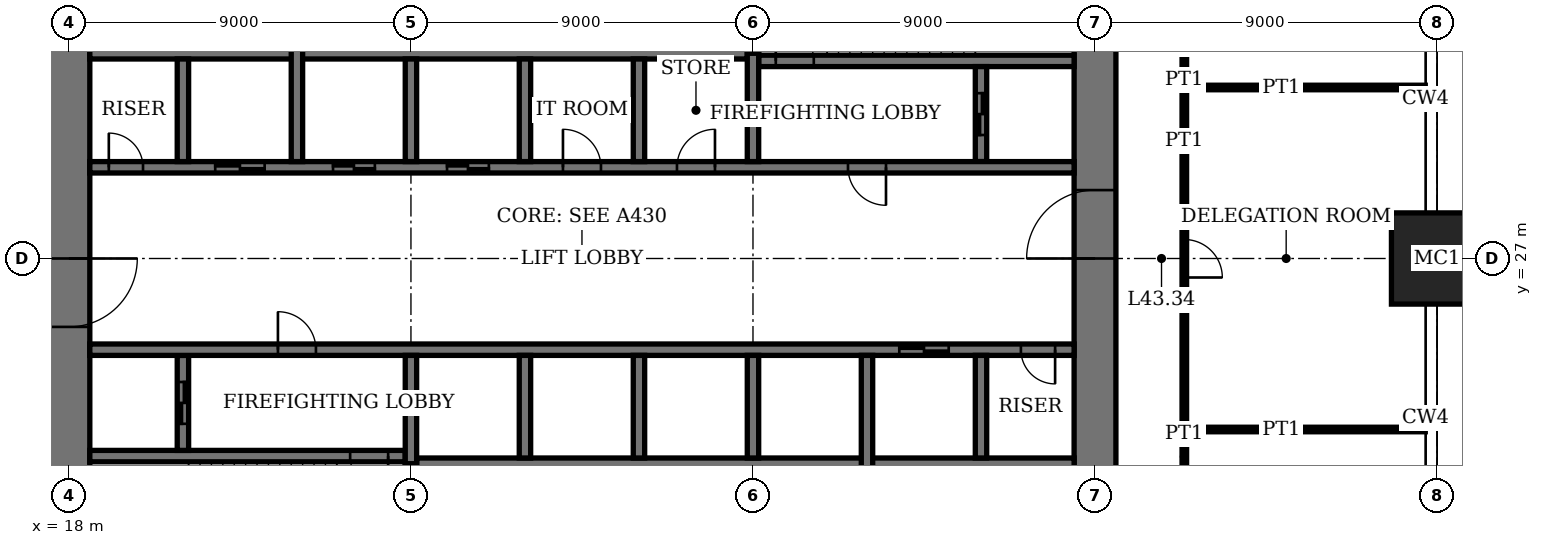
"""IFC4 building model, lengths in metres.
Left out: names, types, materials, properties, quantities, classifications, styles, units other than length and angle.
Written with IfcOpenShell. Run it as: python <this file> out.ifc"""

import sys

from ifc_helpers import new_model, si_unit, direction, frame, frame_2d, origin, origin_2d, place, context, subcontext, project, spatial, rectangle, extrude, element, fill, save


model = new_model("IFC4")
c1 = context("Model", 3, precision=1e-05, world=origin(), true_north=direction((0.0, 1.0)))
c2 = subcontext(c1, "Body", "Model", "MODEL_VIEW")
j1 = project(units=[si_unit("LENGTHUNIT", "METRE"), si_unit("PLANEANGLEUNIT", "RADIAN")], contexts=[c1])
p1 = place(None, origin())
s1 = spatial("IfcSite", under=j1, at=p1, CompositionType="ELEMENT")
p2 = place(p1, origin())
s2 = spatial("IfcBuilding", under=s1, at=p2, CompositionType="ELEMENT")
p3 = place(p2, frame((0.0, 0.0, 178.2)))
s3 = spatial("IfcBuildingStorey", under=s2, at=p3, CompositionType="ELEMENT", Elevation=178.2)
p4 = place(p3, frame((54.0, 27.0, 0.0), z_axis=(0.0, 0.0, 1.0), x_axis=(1.0, 0.0, 0.0)))
e1 = element("IfcColumn", 1, at=p4, inside=s3, PredefinedType="COLUMN", context=c2, shape_type="SweptSolid", body=[
    extrude(rectangle(XDim=2.4, YDim=2.4, at=origin_2d()), origin(), (0.0, 0.0, 1.0), 4.0),
])
p5 = place(p3, frame((18.0, 35.45, 0.0), z_axis=(0.0, 0.0, 1.0), x_axis=(0.0, -1.0, 0.0)))
e2 = element("IfcWall", 2, at=p5, inside=s3, PredefinedType="SHEAR", context=c2, shape_type="SweptSolid", body=[
    extrude(rectangle(XDim=16.9, YDim=1.1, at=frame_2d((8.45, 0.0))), origin(), (0.0, 0.0, 1.0), 4.0),
])
p6 = place(p5, frame((8.45, 0.0, 0.0)))
e3 = element("IfcOpeningElement", 3, at=p6, cuts=e2, PredefinedType="OPENING", context=c2, shape_type="SweptSolid", body=[
    extrude(rectangle(XDim=1.8, YDim=2.4, at=frame_2d((0.9, 1.2))), frame((0.0, 0.56, 0.0), z_axis=(0.0, -1.0, 0.0), x_axis=(1.0, 0.0, 0.0)), (0.0, 0.0, 1.0), 1.12),
])
p7 = place(p3, frame((45.0, 18.55, 0.0), z_axis=(0.0, 0.0, 1.0), x_axis=(0.0, 1.0, 0.0)))
e4 = element("IfcWall", 4, at=p7, inside=s3, PredefinedType="SHEAR", context=c2, shape_type="SweptSolid", body=[
    extrude(rectangle(XDim=16.9, YDim=1.1, at=frame_2d((8.45, 0.0))), origin(), (0.0, 0.0, 1.0), 4.0),
])
p8 = place(p7, frame((8.45, 0.0, 0.0)))
e5 = element("IfcOpeningElement", 5, at=p8, cuts=e4, PredefinedType="OPENING", context=c2, shape_type="SweptSolid", body=[
    extrude(rectangle(XDim=1.8, YDim=2.4, at=frame_2d((0.9, 1.2))), frame((0.0, 0.56, 0.0), z_axis=(0.0, -1.0, 0.0), x_axis=(1.0, 0.0, 0.0)), (0.0, 0.0, 1.0), 1.12),
])
p9 = place(p3, frame((18.55, 21.8, 0.0), z_axis=(0.0, 0.0, 1.0), x_axis=(1.0, 0.0, 0.0)))
e6 = element("IfcWall", 6, at=p9, inside=s3, PredefinedType="SHEAR", context=c2, shape_type="SweptSolid", body=[
    extrude(rectangle(XDim=8.3, YDim=0.3, at=frame_2d((4.15, 0.0))), origin(), (0.0, 0.0, 1.0), 4.0),
])
p10 = place(p9, frame((6.85, 0.0, 0.0)))
e7 = element("IfcOpeningElement", 7, at=p10, cuts=e6, PredefinedType="OPENING", context=c2, shape_type="SweptSolid", body=[
    extrude(rectangle(XDim=1.0, YDim=2.4, at=frame_2d((0.5, 1.2))), frame((0.0, 0.16, 0.0), z_axis=(0.0, -1.0, 0.0), x_axis=(1.0, 0.0, 0.0)), (0.0, 0.0, 1.0), 0.32),
])
p11 = place(p3, frame((36.15, 32.2, 0.0), z_axis=(0.0, 0.0, 1.0), x_axis=(1.0, 0.0, 0.0)))
e8 = element("IfcWall", 8, at=p11, inside=s3, PredefinedType="SHEAR", context=c2, shape_type="SweptSolid", body=[
    extrude(rectangle(XDim=8.3, YDim=0.3, at=frame_2d((4.15, 0.0))), origin(), (0.0, 0.0, 1.0), 4.0),
])
p12 = place(p11, frame((0.45, 0.0, 0.0)))
e9 = element("IfcOpeningElement", 9, at=p12, cuts=e8, PredefinedType="OPENING", context=c2, shape_type="SweptSolid", body=[
    extrude(rectangle(XDim=1.0, YDim=2.4, at=frame_2d((0.5, 1.2))), frame((0.0, 0.16, 0.0), z_axis=(0.0, -1.0, 0.0), x_axis=(1.0, 0.0, 0.0)), (0.0, 0.0, 1.0), 0.32),
])
for number, where, z_axis, x_axis in (
    (10, (27.0, 18.55, 0.0), (0.0, 0.0, 1.0), (0.0, 1.0, 0.0)),
    (11, (36.0, 32.4, 0.0), (0.0, 0.0, 1.0), (0.0, 1.0, 0.0)),
):
    element("IfcWall", number, at=place(p3, frame(where, z_axis=z_axis, x_axis=x_axis)), inside=s3, PredefinedType="SHEAR", context=c2, shape_type="SweptSolid", body=[
        extrude(rectangle(XDim=3.05, YDim=0.3, at=frame_2d((1.525, 0.0))), origin(), (0.0, 0.0, 1.0), 4.0),
    ])
p13 = place(p3, frame((21.0, 21.95, 0.0), z_axis=(0.0, 0.0, 1.0), x_axis=(0.0, 1.0, 0.0)))
e12 = element("IfcWall", 12, at=p13, inside=s3, PredefinedType="SHEAR", context=c2, shape_type="SweptSolid", body=[
    extrude(rectangle(XDim=2.5, YDim=0.3, at=frame_2d((1.25, 0.0))), origin(), (0.0, 0.0, 1.0), 4.0),
])
p14 = place(p13, frame((0.7, 0.0, 0.0)))
e13 = element("IfcOpeningElement", 13, at=p14, cuts=e12, PredefinedType="OPENING", context=c2, shape_type="SweptSolid", body=[
    extrude(rectangle(XDim=1.1, YDim=2.4, at=frame_2d((0.55, 1.2))), frame((0.0, 0.16, 0.0), z_axis=(0.0, -1.0, 0.0), x_axis=(1.0, 0.0, 0.0)), (0.0, 0.0, 1.0), 0.32),
])
p15 = place(p3, frame((42.0, 29.55, 0.0), z_axis=(0.0, 0.0, 1.0), x_axis=(0.0, 1.0, 0.0)))
e14 = element("IfcWall", 14, at=p15, inside=s3, PredefinedType="SHEAR", context=c2, shape_type="SweptSolid", body=[
    extrude(rectangle(XDim=2.5, YDim=0.3, at=frame_2d((1.25, 0.0))), origin(), (0.0, 0.0, 1.0), 4.0),
])
p16 = place(p15, frame((0.7, 0.0, 0.0)))
e15 = element("IfcOpeningElement", 15, at=p16, cuts=e14, PredefinedType="OPENING", context=c2, shape_type="SweptSolid", body=[
    extrude(rectangle(XDim=1.1, YDim=2.4, at=frame_2d((0.55, 1.2))), frame((0.0, 0.16, 0.0), z_axis=(0.0, -1.0, 0.0), x_axis=(1.0, 0.0, 0.0)), (0.0, 0.0, 1.0), 0.32),
])
p17 = place(p3, frame((18.55, 24.6, 0.0), z_axis=(0.0, 0.0, 1.0), x_axis=(1.0, 0.0, 0.0)))
e16 = element("IfcWall", 16, at=p17, inside=s3, PredefinedType="SHEAR", context=c2, shape_type="SweptSolid", body=[
    extrude(rectangle(XDim=25.9, YDim=0.3, at=frame_2d((12.95, 0.0))), origin(), (0.0, 0.0, 1.0), 4.0),
])
p18 = place(p17, frame((4.95, 0.0, 0.0)))
e17 = element("IfcOpeningElement", 17, at=p18, cuts=e16, PredefinedType="OPENING", context=c2, shape_type="SweptSolid", body=[
    extrude(rectangle(XDim=1.0, YDim=2.4, at=frame_2d((0.5, 1.2))), frame((0.0, 0.16, 0.0), z_axis=(0.0, -1.0, 0.0), x_axis=(1.0, 0.0, 0.0)), (0.0, 0.0, 1.0), 0.32),
])
p19 = place(p17, frame((24.5, 0.0, 0.0)))
e18 = element("IfcOpeningElement", 18, at=p19, cuts=e16, PredefinedType="OPENING", context=c2, shape_type="SweptSolid", body=[
    extrude(rectangle(XDim=0.9, YDim=2.1, at=frame_2d((0.45, 1.05))), frame((0.0, 0.16, 0.0), z_axis=(0.0, -1.0, 0.0), x_axis=(1.0, 0.0, 0.0)), (0.0, 0.0, 1.0), 0.32),
])
p20 = place(p17, frame((21.3, 0.0, 0.0)))
e19 = element("IfcOpeningElement", 19, at=p20, cuts=e16, PredefinedType="OPENING", context=c2, shape_type="SweptSolid", body=[
    extrude(rectangle(XDim=1.3, YDim=2.4, at=frame_2d((0.65, 1.2))), frame((0.0, 0.16, 0.0), z_axis=(0.0, -1.0, 0.0), x_axis=(1.0, 0.0, 0.0)), (0.0, 0.0, 1.0), 0.32),
])
p21 = place(p3, frame((18.55, 29.4, 0.0), z_axis=(0.0, 0.0, 1.0), x_axis=(1.0, 0.0, 0.0)))
e20 = element("IfcWall", 20, at=p21, inside=s3, PredefinedType="SHEAR", context=c2, shape_type="SweptSolid", body=[
    extrude(rectangle(XDim=25.9, YDim=0.3, at=frame_2d((12.95, 0.0))), origin(), (0.0, 0.0, 1.0), 4.0),
])
p22 = place(p21, frame((19.95, 0.0, 0.0)))
e21 = element("IfcOpeningElement", 21, at=p22, cuts=e20, PredefinedType="OPENING", context=c2, shape_type="SweptSolid", body=[
    extrude(rectangle(XDim=1.0, YDim=2.4, at=frame_2d((0.5, 1.2))), frame((0.0, 0.16, 0.0), z_axis=(0.0, -1.0, 0.0), x_axis=(1.0, 0.0, 0.0)), (0.0, 0.0, 1.0), 0.32),
])
p23 = place(p21, frame((0.5, 0.0, 0.0)))
e22 = element("IfcOpeningElement", 22, at=p23, cuts=e20, PredefinedType="OPENING", context=c2, shape_type="SweptSolid", body=[
    extrude(rectangle(XDim=0.9, YDim=2.1, at=frame_2d((0.45, 1.05))), frame((0.0, 0.16, 0.0), z_axis=(0.0, -1.0, 0.0), x_axis=(1.0, 0.0, 0.0)), (0.0, 0.0, 1.0), 0.32),
])
p24 = place(p21, frame((15.45, 0.0, 0.0)))
e23 = element("IfcOpeningElement", 23, at=p24, cuts=e20, PredefinedType="OPENING", context=c2, shape_type="SweptSolid", body=[
    extrude(rectangle(XDim=1.0, YDim=2.4, at=frame_2d((0.5, 1.2))), frame((0.0, 0.16, 0.0), z_axis=(0.0, -1.0, 0.0), x_axis=(1.0, 0.0, 0.0)), (0.0, 0.0, 1.0), 0.32),
])
p25 = place(p21, frame((12.45, 0.0, 0.0)))
e24 = element("IfcOpeningElement", 24, at=p25, cuts=e20, PredefinedType="OPENING", context=c2, shape_type="SweptSolid", body=[
    extrude(rectangle(XDim=1.0, YDim=2.4, at=frame_2d((0.5, 1.2))), frame((0.0, 0.16, 0.0), z_axis=(0.0, -1.0, 0.0), x_axis=(1.0, 0.0, 0.0)), (0.0, 0.0, 1.0), 0.32),
])
p26 = place(p21, frame((9.4, 0.0, 0.0)))
e25 = element("IfcOpeningElement", 25, at=p26, cuts=e20, PredefinedType="OPENING", context=c2, shape_type="SweptSolid", body=[
    extrude(rectangle(XDim=1.1, YDim=2.4, at=frame_2d((0.55, 1.2))), frame((0.0, 0.16, 0.0), z_axis=(0.0, -1.0, 0.0), x_axis=(1.0, 0.0, 0.0)), (0.0, 0.0, 1.0), 0.32),
])
p27 = place(p21, frame((6.4, 0.0, 0.0)))
e26 = element("IfcOpeningElement", 26, at=p27, cuts=e20, PredefinedType="OPENING", context=c2, shape_type="SweptSolid", body=[
    extrude(rectangle(XDim=1.1, YDim=2.4, at=frame_2d((0.55, 1.2))), frame((0.0, 0.16, 0.0), z_axis=(0.0, -1.0, 0.0), x_axis=(1.0, 0.0, 0.0)), (0.0, 0.0, 1.0), 0.32),
])
p28 = place(p21, frame((3.3, 0.0, 0.0)))
e27 = element("IfcOpeningElement", 27, at=p28, cuts=e20, PredefinedType="OPENING", context=c2, shape_type="SweptSolid", body=[
    extrude(rectangle(XDim=1.3, YDim=2.4, at=frame_2d((0.65, 1.2))), frame((0.0, 0.16, 0.0), z_axis=(0.0, -1.0, 0.0), x_axis=(1.0, 0.0, 0.0)), (0.0, 0.0, 1.0), 0.32),
])
for number, where, z_axis, x_axis in (
    (28, (27.15, 21.6, 0.0), (0.0, 0.0, 1.0), (1.0, 0.0, 0.0)),
    (29, (18.55, 32.4, 0.0), (0.0, 0.0, 1.0), (1.0, 0.0, 0.0)),
):
    element("IfcWall", number, at=place(p3, frame(where, z_axis=z_axis, x_axis=x_axis)), inside=s3, PredefinedType="SHEAR", context=c2, shape_type="SweptSolid", body=[
        extrude(rectangle(XDim=17.3, YDim=0.3, at=frame_2d((8.65, 0.0))), origin(), (0.0, 0.0, 1.0), 4.0),
    ])
for number, where, z_axis, x_axis in (
    (30, (30.0, 21.75, 0.0), (0.0, 0.0, 1.0), (0.0, 1.0, 0.0)),
    (31, (33.0, 29.55, 0.0), (0.0, 0.0, 1.0), (0.0, 1.0, 0.0)),
    (32, (33.0, 21.75, 0.0), (0.0, 0.0, 1.0), (0.0, 1.0, 0.0)),
    (33, (30.0, 29.55, 0.0), (0.0, 0.0, 1.0), (0.0, 1.0, 0.0)),
    (34, (36.0, 21.75, 0.0), (0.0, 0.0, 1.0), (0.0, 1.0, 0.0)),
    (35, (27.0, 29.55, 0.0), (0.0, 0.0, 1.0), (0.0, 1.0, 0.0)),
):
    element("IfcWall", number, at=place(p3, frame(where, z_axis=z_axis, x_axis=x_axis)), inside=s3, PredefinedType="SHEAR", context=c2, shape_type="SweptSolid", body=[
        extrude(rectangle(XDim=2.7, YDim=0.3, at=frame_2d((1.35, 0.0))), origin(), (0.0, 0.0, 1.0), 4.0),
    ])
for number, where, z_axis, x_axis in (
    (36, (39.0, 18.55, 0.0), (0.0, 0.0, 1.0), (0.0, 1.0, 0.0)),
    (37, (24.0, 29.55, 0.0), (0.0, 0.0, 1.0), (0.0, 1.0, 0.0)),
):
    element("IfcWall", number, at=place(p3, frame(where, z_axis=z_axis, x_axis=x_axis)), inside=s3, PredefinedType="SHEAR", context=c2, shape_type="SweptSolid", body=[
        extrude(rectangle(XDim=5.9, YDim=0.3, at=frame_2d((2.95, 0.0))), origin(), (0.0, 0.0, 1.0), 4.0),
    ])
for number, where, z_axis, x_axis in (
    (38, (42.0, 21.75, 0.0), (0.0, 0.0, 1.0), (0.0, 1.0, 0.0)),
    (39, (21.0, 29.55, 0.0), (0.0, 0.0, 1.0), (0.0, 1.0, 0.0)),
):
    element("IfcWall", number, at=place(p3, frame(where, z_axis=z_axis, x_axis=x_axis)), inside=s3, PredefinedType="SHEAR", context=c2, shape_type="SweptSolid", body=[
        extrude(rectangle(XDim=2.7, YDim=0.3, at=frame_2d((1.35, 0.0))), origin(), (0.0, 0.0, 1.0), 4.0),
    ])
for number, where, z_axis, x_axis in (
    (40, (27.0, 21.6, 0.0), (0.0, 0.0, 1.0), (0.0, 1.0, 0.0)),
    (41, (36.0, 29.55, 0.0), (0.0, 0.0, 1.0), (0.0, 1.0, 0.0)),
):
    element("IfcWall", number, at=place(p3, frame(where, z_axis=z_axis, x_axis=x_axis)), inside=s3, PredefinedType="SHEAR", context=c2, shape_type="SweptSolid", body=[
        extrude(rectangle(XDim=2.85, YDim=0.3, at=frame_2d((1.425, 0.0))), origin(), (0.0, 0.0, 1.0), 4.0),
    ])
for number, where, z_axis, x_axis in (
    (42, (47.35, 22.5, 0.0), (0.0, 0.0, 1.0), (1.0, 0.0, 0.0)),
    (43, (47.35, 31.5, 0.0), (0.0, 0.0, 1.0), (1.0, 0.0, 0.0)),
):
    element("IfcWall", number, at=place(p3, frame(where, z_axis=z_axis, x_axis=x_axis)), inside=s3, PredefinedType="PARTITIONING", context=c2, shape_type="SweptSolid", body=[
        extrude(rectangle(XDim=6.34, YDim=0.12, at=frame_2d((3.17, 0.0))), origin(), (0.0, 0.0, 1.0), 3.1),
    ])
p29 = place(p3, frame((47.35, 18.0, 0.0), z_axis=(0.0, 0.0, 1.0), x_axis=(0.0, 1.0, 0.0)))
e44 = element("IfcWall", 44, at=p29, inside=s3, PredefinedType="PARTITIONING", context=c2, shape_type="SweptSolid", body=[
    extrude(rectangle(XDim=4.5, YDim=0.12, at=frame_2d((2.25, 0.0))), origin(), (0.0, 0.0, 1.0), 3.75),
])
p30 = place(p29, frame((1.75, 0.0, 0.0)))
e45 = element("IfcOpeningElement", 45, at=p30, cuts=e44, PredefinedType="OPENING", context=c2, shape_type="SweptSolid", body=[
    extrude(rectangle(XDim=1.0, YDim=2.4, at=frame_2d((0.5, 1.2))), frame((0.0, 0.07, 0.0), z_axis=(0.0, -1.0, 0.0), x_axis=(1.0, 0.0, 0.0)), (0.0, 0.0, 1.0), 0.14),
])
p31 = place(p3, frame((47.35, 22.5, 0.0), z_axis=(0.0, 0.0, 1.0), x_axis=(0.0, 1.0, 0.0)))
e46 = element("IfcWall", 46, at=p31, inside=s3, PredefinedType="PARTITIONING", context=c2, shape_type="SweptSolid", body=[
    extrude(rectangle(XDim=9.0, YDim=0.12, at=frame_2d((4.5, 0.0))), origin(), (0.0, 0.0, 1.0), 3.75),
])
p32 = place(p31, frame((4.0, 0.0, 0.0)))
e47 = element("IfcOpeningElement", 47, at=p32, cuts=e46, PredefinedType="OPENING", context=c2, shape_type="SweptSolid", body=[
    extrude(rectangle(XDim=1.0, YDim=2.4, at=frame_2d((0.5, 1.2))), frame((0.0, 0.07, 0.0), z_axis=(0.0, -1.0, 0.0), x_axis=(1.0, 0.0, 0.0)), (0.0, 0.0, 1.0), 0.14),
])
p33 = place(p3, frame((47.35, 31.5, 0.0), z_axis=(0.0, 0.0, 1.0), x_axis=(0.0, 1.0, 0.0)))
e48 = element("IfcWall", 48, at=p33, inside=s3, PredefinedType="PARTITIONING", context=c2, shape_type="SweptSolid", body=[
    extrude(rectangle(XDim=4.5, YDim=0.12, at=frame_2d((2.25, 0.0))), origin(), (0.0, 0.0, 1.0), 3.75),
])
p34 = place(p33, frame((1.75, 0.0, 0.0)))
e49 = element("IfcOpeningElement", 49, at=p34, cuts=e48, PredefinedType="OPENING", context=c2, shape_type="SweptSolid", body=[
    extrude(rectangle(XDim=1.0, YDim=2.4, at=frame_2d((0.5, 1.2))), frame((0.0, 0.07, 0.0), z_axis=(0.0, -1.0, 0.0), x_axis=(1.0, 0.0, 0.0)), (0.0, 0.0, 1.0), 0.14),
])
p35 = place(p6, origin())
e50 = element("IfcDoor", 50, at=p35, inside=s3, OperationType="DOUBLE_DOOR_DOUBLE_SWING", PredefinedType="DOOR", context=c2, shape_type="SweptSolid", body=[
    extrude(rectangle(XDim=1.8, YDim=2.4, at=frame_2d((0.9, 1.2))), frame((0.0, 0.03, 0.0), z_axis=(0.0, -1.0, 0.0), x_axis=(1.0, 0.0, 0.0)), (0.0, 0.0, 1.0), 0.06),
    extrude(rectangle(XDim=0.04, YDim=2.4, at=frame_2d((0.02, 1.2))), frame((0.0, 0.55, 0.0), z_axis=(0.0, -1.0, 0.0), x_axis=(1.0, 0.0, 0.0)), (0.0, 0.0, 1.0), 1.1),
    extrude(rectangle(XDim=0.04, YDim=2.4, at=frame_2d((1.78, 1.2))), frame((0.0, 0.55, 0.0), z_axis=(0.0, -1.0, 0.0), x_axis=(1.0, 0.0, 0.0)), (0.0, 0.0, 1.0), 1.1),
    extrude(rectangle(XDim=1.8, YDim=0.04, at=frame_2d((0.9, 2.38))), frame((0.0, 0.55, 0.0), z_axis=(0.0, -1.0, 0.0), x_axis=(1.0, 0.0, 0.0)), (0.0, 0.0, 1.0), 1.1),
])
fill(e3, e50)
p36 = place(p8, origin())
e51 = element("IfcDoor", 51, at=p36, inside=s3, OperationType="DOUBLE_DOOR_DOUBLE_SWING", PredefinedType="DOOR", context=c2, shape_type="SweptSolid", body=[
    extrude(rectangle(XDim=1.8, YDim=2.4, at=frame_2d((0.9, 1.2))), frame((0.0, 0.03, 0.0), z_axis=(0.0, -1.0, 0.0), x_axis=(1.0, 0.0, 0.0)), (0.0, 0.0, 1.0), 0.06),
    extrude(rectangle(XDim=0.04, YDim=2.4, at=frame_2d((0.02, 1.2))), frame((0.0, 0.55, 0.0), z_axis=(0.0, -1.0, 0.0), x_axis=(1.0, 0.0, 0.0)), (0.0, 0.0, 1.0), 1.1),
    extrude(rectangle(XDim=0.04, YDim=2.4, at=frame_2d((1.78, 1.2))), frame((0.0, 0.55, 0.0), z_axis=(0.0, -1.0, 0.0), x_axis=(1.0, 0.0, 0.0)), (0.0, 0.0, 1.0), 1.1),
    extrude(rectangle(XDim=1.8, YDim=0.04, at=frame_2d((0.9, 2.38))), frame((0.0, 0.55, 0.0), z_axis=(0.0, -1.0, 0.0), x_axis=(1.0, 0.0, 0.0)), (0.0, 0.0, 1.0), 1.1),
])
fill(e5, e51)
p37 = place(p10, origin())
e52 = element("IfcDoor", 52, at=p37, inside=s3, OperationType="SINGLE_SWING_RIGHT", PredefinedType="DOOR", context=c2, shape_type="SweptSolid", body=[
    extrude(rectangle(XDim=1.0, YDim=2.4, at=frame_2d((0.5, 1.2))), frame((0.0, 0.03, 0.0), z_axis=(0.0, -1.0, 0.0), x_axis=(1.0, 0.0, 0.0)), (0.0, 0.0, 1.0), 0.06),
])
fill(e7, e52)
p38 = place(p12, origin())
e53 = element("IfcDoor", 53, at=p38, inside=s3, OperationType="SINGLE_SWING_RIGHT", PredefinedType="DOOR", context=c2, shape_type="SweptSolid", body=[
    extrude(rectangle(XDim=1.0, YDim=2.4, at=frame_2d((0.5, 1.2))), frame((0.0, 0.03, 0.0), z_axis=(0.0, -1.0, 0.0), x_axis=(1.0, 0.0, 0.0)), (0.0, 0.0, 1.0), 0.06),
])
fill(e9, e53)
p39 = place(p18, origin())
e54 = element("IfcDoor", 54, at=p39, inside=s3, OperationType="SINGLE_SWING_RIGHT", PredefinedType="DOOR", context=c2, shape_type="SweptSolid", body=[
    extrude(rectangle(XDim=1.0, YDim=2.4, at=frame_2d((0.5, 1.2))), frame((0.0, 0.03, 0.0), z_axis=(0.0, -1.0, 0.0), x_axis=(1.0, 0.0, 0.0)), (0.0, 0.0, 1.0), 0.06),
])
fill(e17, e54)
p40 = place(p22, origin())
e55 = element("IfcDoor", 55, at=p40, inside=s3, OperationType="SINGLE_SWING_RIGHT", PredefinedType="DOOR", context=c2, shape_type="SweptSolid", body=[
    extrude(rectangle(XDim=1.0, YDim=2.4, at=frame_2d((0.5, 1.2))), frame((0.0, 0.03, 0.0), z_axis=(0.0, -1.0, 0.0), x_axis=(1.0, 0.0, 0.0)), (0.0, 0.0, 1.0), 0.06),
])
fill(e21, e55)
p41 = place(p19, origin())
e56 = element("IfcDoor", 56, at=p41, inside=s3, OperationType="SINGLE_SWING_RIGHT", PredefinedType="DOOR", context=c2, shape_type="SweptSolid", body=[
    extrude(rectangle(XDim=0.9, YDim=2.1, at=frame_2d((0.45, 1.05))), frame((0.0, 0.03, 0.0), z_axis=(0.0, -1.0, 0.0), x_axis=(1.0, 0.0, 0.0)), (0.0, 0.0, 1.0), 0.06),
])
fill(e18, e56)
p42 = place(p23, origin())
e57 = element("IfcDoor", 57, at=p42, inside=s3, OperationType="SINGLE_SWING_RIGHT", PredefinedType="DOOR", context=c2, shape_type="SweptSolid", body=[
    extrude(rectangle(XDim=0.9, YDim=2.1, at=frame_2d((0.45, 1.05))), frame((0.0, 0.03, 0.0), z_axis=(0.0, -1.0, 0.0), x_axis=(1.0, 0.0, 0.0)), (0.0, 0.0, 1.0), 0.06),
])
fill(e22, e57)
p43 = place(p32, origin())
e58 = element("IfcDoor", 58, at=p43, inside=s3, OperationType="SINGLE_SWING_LEFT", PredefinedType="DOOR", context=c2, shape_type="SweptSolid", body=[
    extrude(rectangle(XDim=1.0, YDim=2.4, at=frame_2d((0.5, 1.2))), frame((0.0, 0.025, 0.0), z_axis=(0.0, -1.0, 0.0), x_axis=(1.0, 0.0, 0.0)), (0.0, 0.0, 1.0), 0.05),
])
fill(e47, e58)
p44 = place(p24, origin())
e59 = element("IfcDoor", 59, at=p44, inside=s3, OperationType="SINGLE_SWING_LEFT", PredefinedType="DOOR", context=c2, shape_type="SweptSolid", body=[
    extrude(rectangle(XDim=1.0, YDim=2.4, at=frame_2d((0.5, 1.2))), frame((0.0, 0.03, 0.0), z_axis=(0.0, -1.0, 0.0), x_axis=(1.0, 0.0, 0.0)), (0.0, 0.0, 1.0), 0.06),
])
fill(e23, e59)
p45 = place(p25, origin())
e60 = element("IfcDoor", 60, at=p45, inside=s3, OperationType="SINGLE_SWING_RIGHT", PredefinedType="DOOR", context=c2, shape_type="SweptSolid", body=[
    extrude(rectangle(XDim=1.0, YDim=2.4, at=frame_2d((0.5, 1.2))), frame((0.0, 0.03, 0.0), z_axis=(0.0, -1.0, 0.0), x_axis=(1.0, 0.0, 0.0)), (0.0, 0.0, 1.0), 0.06),
])
fill(e24, e60)
p46 = place(p26, origin())
e61 = element("IfcDoor", 61, at=p46, inside=s3, OperationType="DOUBLE_DOOR_SLIDING", PredefinedType="DOOR", context=c2, shape_type="SweptSolid", body=[
    extrude(rectangle(XDim=1.1, YDim=2.4, at=frame_2d((0.55, 1.2))), frame((0.0, 0.02, 0.0), z_axis=(0.0, -1.0, 0.0), x_axis=(1.0, 0.0, 0.0)), (0.0, 0.0, 1.0), 0.04),
])
fill(e25, e61)
p47 = place(p27, origin())
e62 = element("IfcDoor", 62, at=p47, inside=s3, OperationType="DOUBLE_DOOR_SLIDING", PredefinedType="DOOR", context=c2, shape_type="SweptSolid", body=[
    extrude(rectangle(XDim=1.1, YDim=2.4, at=frame_2d((0.55, 1.2))), frame((0.0, 0.02, 0.0), z_axis=(0.0, -1.0, 0.0), x_axis=(1.0, 0.0, 0.0)), (0.0, 0.0, 1.0), 0.04),
])
fill(e26, e62)
p48 = place(p20, origin())
e63 = element("IfcDoor", 63, at=p48, inside=s3, OperationType="DOUBLE_DOOR_SLIDING", PredefinedType="DOOR", context=c2, shape_type="SweptSolid", body=[
    extrude(rectangle(XDim=1.3, YDim=2.4, at=frame_2d((0.65, 1.2))), frame((0.0, 0.02, 0.0), z_axis=(0.0, -1.0, 0.0), x_axis=(1.0, 0.0, 0.0)), (0.0, 0.0, 1.0), 0.04),
])
fill(e19, e63)
p49 = place(p28, origin())
e64 = element("IfcDoor", 64, at=p49, inside=s3, OperationType="DOUBLE_DOOR_SLIDING", PredefinedType="DOOR", context=c2, shape_type="SweptSolid", body=[
    extrude(rectangle(XDim=1.3, YDim=2.4, at=frame_2d((0.65, 1.2))), frame((0.0, 0.02, 0.0), z_axis=(0.0, -1.0, 0.0), x_axis=(1.0, 0.0, 0.0)), (0.0, 0.0, 1.0), 0.04),
])
fill(e27, e64)
p50 = place(p14, origin())
e65 = element("IfcDoor", 65, at=p50, inside=s3, OperationType="DOUBLE_DOOR_SLIDING", PredefinedType="DOOR", context=c2, shape_type="SweptSolid", body=[
    extrude(rectangle(XDim=1.1, YDim=2.4, at=frame_2d((0.55, 1.2))), frame((0.0, 0.03, 0.0), z_axis=(0.0, -1.0, 0.0), x_axis=(1.0, 0.0, 0.0)), (0.0, 0.0, 1.0), 0.06),
])
fill(e13, e65)
p51 = place(p16, origin())
e66 = element("IfcDoor", 66, at=p51, inside=s3, OperationType="DOUBLE_DOOR_SLIDING", PredefinedType="DOOR", context=c2, shape_type="SweptSolid", body=[
    extrude(rectangle(XDim=1.1, YDim=2.4, at=frame_2d((0.55, 1.2))), frame((0.0, 0.03, 0.0), z_axis=(0.0, -1.0, 0.0), x_axis=(1.0, 0.0, 0.0)), (0.0, 0.0, 1.0), 0.06),
])
fill(e15, e66)
save(model, sys.argv[1])
